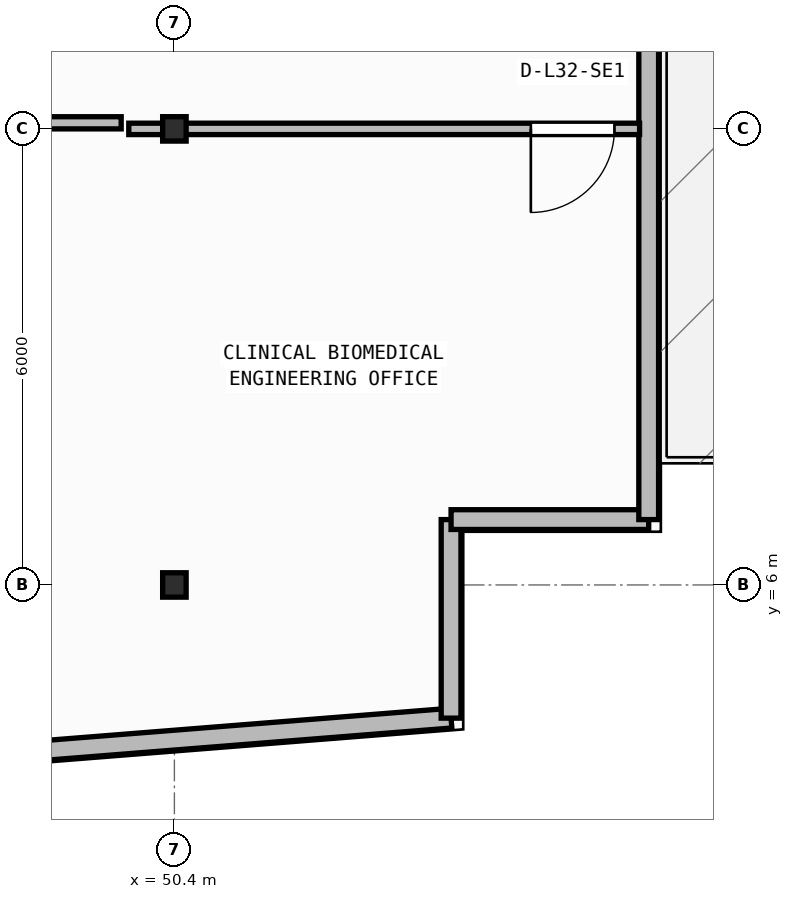
"""IFC4 building model, lengths in metres.
Left out: names, types, materials, properties, quantities, classifications, styles, units other than length and angle.
Written with IfcOpenShell. Run it as: python <this file> out.ifc"""

import sys

from ifc_helpers import new_model, si_unit, direction, frame, frame_2d, origin, origin_2d, place, context, subcontext, project, spatial, rectangle, i_section, extrude, element, fill, save


model = new_model("IFC4")
c1 = context("Model", 3, precision=1e-05, world=origin(), true_north=direction((0.0, 1.0)))
c2 = subcontext(c1, "Body", "Model", "MODEL_VIEW")
j1 = project(units=[si_unit("LENGTHUNIT", "METRE"), si_unit("PLANEANGLEUNIT", "RADIAN")], contexts=[c1])
p1 = place(None, origin())
s1 = spatial("IfcSite", under=j1, at=p1, CompositionType="ELEMENT")
p2 = place(p1, origin())
s2 = spatial("IfcBuilding", under=s1, at=p2, CompositionType="ELEMENT")
p3 = place(p2, frame((0.0, 0.0, 131.0)))
s3 = spatial("IfcBuildingStorey", under=s2, at=p3, CompositionType="ELEMENT", Elevation=131.0)
for number, where, z_axis, x_axis in (
    (1, (50.4, 6.0, 0.0), (0.0, 0.0, 1.0), (1.0, 0.0, 0.0)),
    (2, (50.4, 12.0, 0.0), (0.0, 0.0, 1.0), (1.0, 0.0, 0.0)),
):
    element("IfcColumn", number, at=place(p3, frame(where, z_axis=z_axis, x_axis=x_axis)), inside=s3, PredefinedType="COLUMN", context=c2, shape_type="SweptSolid", body=[
        extrude(i_section(OverallWidth=0.309, OverallDepth=0.321, WebThickness=0.014, FlangeThickness=0.022, FilletRadius=0.017, at=origin_2d()), origin(), (0.0, 0.0, 1.0), 3.95),
    ])
p4 = place(p3, frame((2.76, 0.173, 0.0), z_axis=(0.0, 0.0, 1.0), x_axis=(0.996857931723, 0.079210251617, 0.0)))
e3 = element("IfcWall", 3, at=p4, inside=s3, PredefinedType="STANDARD", context=c2, shape_type="SweptSolid", body=[
    extrude(rectangle(XDim=51.442, YDim=0.26, at=frame_2d((25.721, 0.0))), origin(), (0.0, 0.0, 1.0), 3.71),
])
p5 = place(p4, frame((24.521, 0.0, 0.9)))
e4 = element("IfcOpeningElement", 4, at=p5, cuts=e3, PredefinedType="OPENING", context=c2, shape_type="SweptSolid", body=[
    extrude(rectangle(XDim=2.4, YDim=1.65, at=frame_2d((1.2, 0.825))), frame((0.0, 0.14, 0.0), z_axis=(0.0, -1.0, 0.0), x_axis=(1.0, 0.0, 0.0)), (0.0, 0.0, 1.0), 0.28),
])
p6 = place(p3, frame((54.04, 4.248, 0.0), z_axis=(0.0, 0.0, 1.0), x_axis=(0.0, 1.0, 0.0)))
e5 = element("IfcWall", 5, at=p6, inside=s3, PredefinedType="STANDARD", context=c2, shape_type="SweptSolid", body=[
    extrude(rectangle(XDim=2.612, YDim=0.26, at=frame_2d((1.306, 0.0))), origin(), (0.0, 0.0, 1.0), 3.71),
])
p7 = place(p3, frame((54.04, 6.86, 0.0), z_axis=(0.0, 0.0, 1.0), x_axis=(1.0, 0.0, 0.0)))
e6 = element("IfcWall", 6, at=p7, inside=s3, PredefinedType="STANDARD", context=c2, shape_type="SweptSolid", body=[
    extrude(rectangle(XDim=2.6, YDim=0.26, at=frame_2d((1.3, 0.0))), origin(), (0.0, 0.0, 1.0), 3.71),
])
p8 = place(p3, frame((56.64, 6.86, 0.0), z_axis=(0.0, 0.0, 1.0), x_axis=(0.0, 1.0, 0.0)))
e7 = element("IfcWall", 7, at=p8, inside=s3, PredefinedType="STANDARD", context=c2, shape_type="SweptSolid", body=[
    extrude(rectangle(XDim=23.48, YDim=0.26, at=frame_2d((11.74, 0.0))), origin(), (0.0, 0.0, 1.0), 3.71),
])
p9 = place(p8, frame((9.24, 0.0, 0.0)))
e8 = element("IfcOpeningElement", 8, at=p9, cuts=e7, PredefinedType="OPENING", context=c2, shape_type="SweptSolid", body=[
    extrude(rectangle(XDim=1.3, YDim=2.15, at=frame_2d((0.65, 1.075))), frame((0.0, 0.14, 0.0), z_axis=(0.0, -1.0, 0.0), x_axis=(1.0, 0.0, 0.0)), (0.0, 0.0, 1.0), 0.28),
])
p10 = place(p3, frame((56.52, 12.0, 0.0), z_axis=(0.0, 0.0, 1.0), x_axis=(-1.0, 0.0, 0.0)))
e9 = element("IfcWall", 9, at=p10, inside=s3, PredefinedType="PARTITIONING", context=c2, shape_type="SweptSolid", body=[
    extrude(rectangle(XDim=6.72, YDim=0.15, at=frame_2d((3.36, 0.0))), origin(), (0.0, 0.0, 1.0), 3.083),
])
p11 = place(p10, frame((0.331, 0.0, 0.0)))
e10 = element("IfcOpeningElement", 10, at=p11, cuts=e9, PredefinedType="OPENING", context=c2, shape_type="SweptSolid", body=[
    extrude(rectangle(XDim=1.1, YDim=2.1, at=frame_2d((0.55, 1.05))), frame((0.0, 0.085, 0.0), z_axis=(0.0, -1.0, 0.0), x_axis=(1.0, 0.0, 0.0)), (0.0, 0.0, 1.0), 0.17),
])
p12 = place(p3, frame((46.689, 12.08, 0.0), z_axis=(0.0, 0.0, 1.0), x_axis=(1.0, 0.0, 0.0)))
e11 = element("IfcWall", 11, at=p12, inside=s3, PredefinedType="PARTITIONING", context=c2, shape_type="SweptSolid", body=[
    extrude(rectangle(XDim=3.011, YDim=0.16, at=frame_2d((1.505, 0.0))), origin(), (0.0, 0.0, 1.0), 3.083),
])
p13 = place(p11, origin())
e12 = element("IfcDoor", 12, at=p13, inside=s3, OperationType="SINGLE_SWING_RIGHT", PredefinedType="DOOR", context=c2, shape_type="SweptSolid", body=[
    extrude(rectangle(XDim=1.1, YDim=2.1, at=frame_2d((0.55, 1.05))), frame((0.0, 0.025, 0.0), z_axis=(0.0, -1.0, 0.0), x_axis=(1.0, 0.0, 0.0)), (0.0, 0.0, 1.0), 0.05),
])
fill(e10, e12)
save(model, sys.argv[1])
